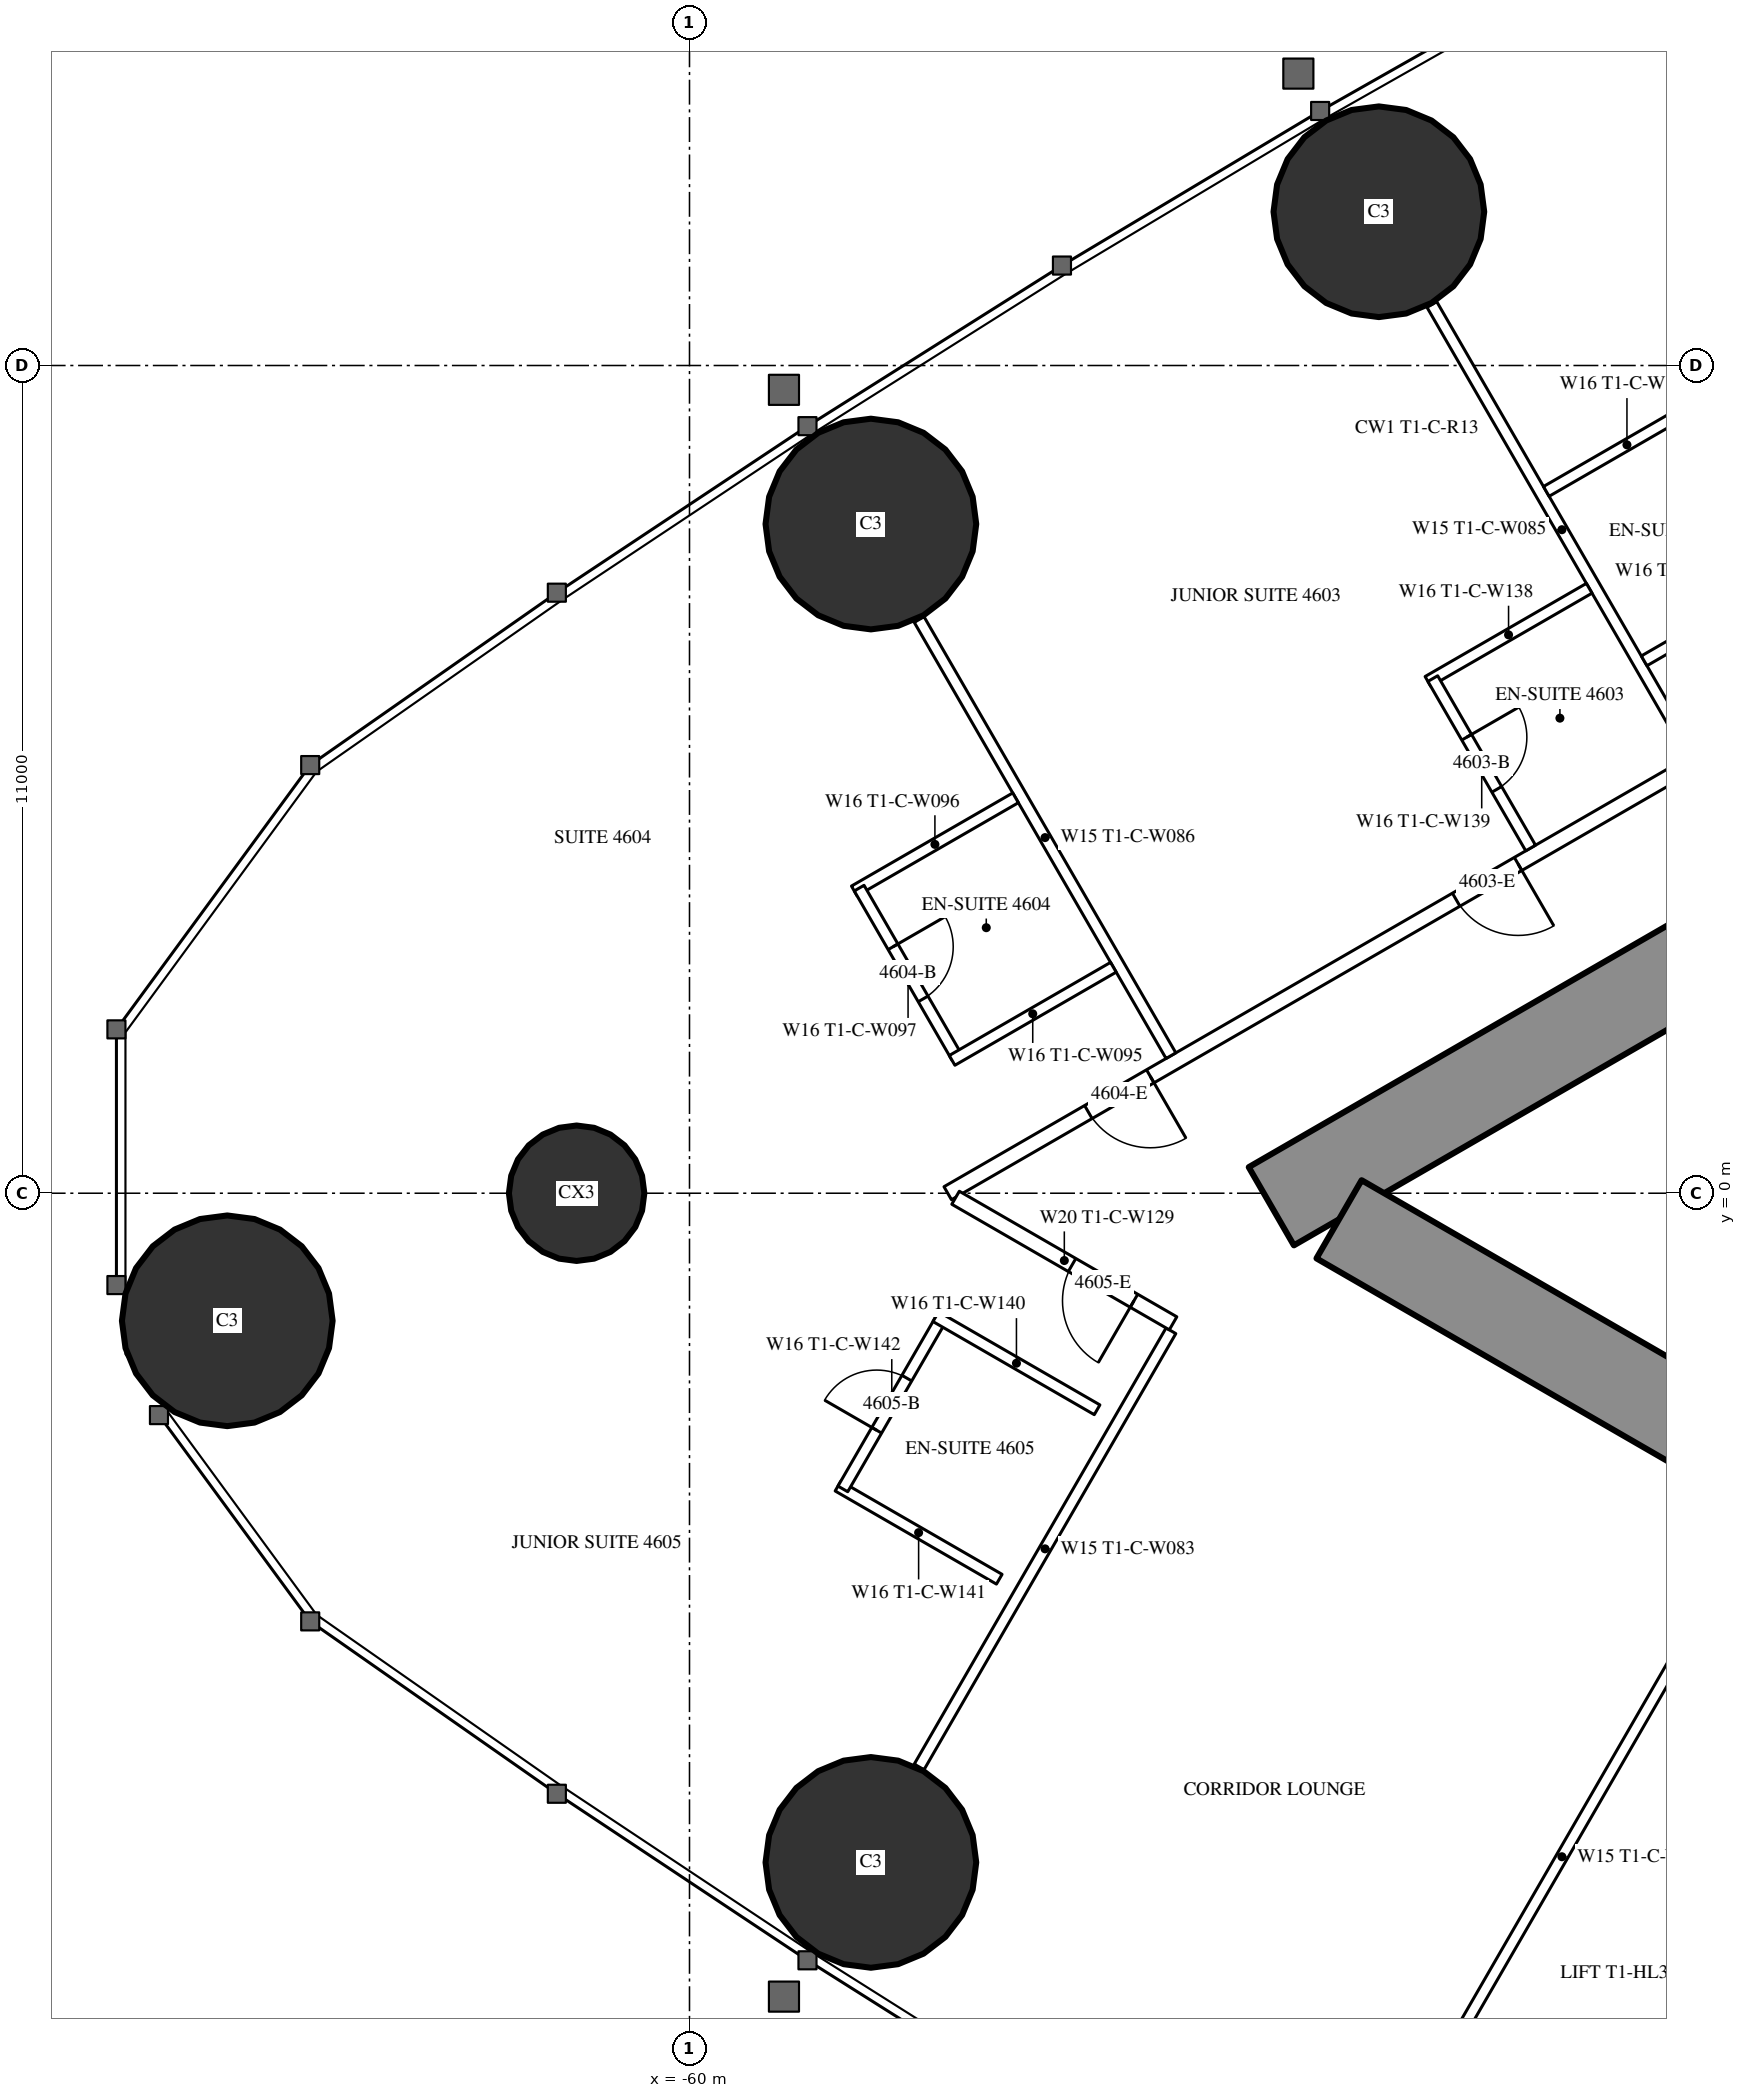
"""IFC4 building model, lengths in metres.
Left out: names, types, materials, properties, quantities, classifications, styles, units other than length and angle.
Written with IfcOpenShell. Run it as: python <this file> out.ifc"""

import sys

from ifc_helpers import new_model, si_unit, direction, frame, frame_2d, origin, origin_2d, place, context, subcontext, project, spatial, rectangle, circle, extrude, element, fill, save


model = new_model("IFC4")
c1 = context("Model", 3, precision=1e-05, world=origin(), true_north=direction((0.0, 1.0)))
c2 = subcontext(c1, "Body", "Model", "MODEL_VIEW")
j1 = project(units=[si_unit("LENGTHUNIT", "METRE"), si_unit("PLANEANGLEUNIT", "RADIAN")], contexts=[c1])
p1 = place(None, origin())
s1 = spatial("IfcSite", under=j1, at=p1, CompositionType="ELEMENT")
p2 = place(p1, origin())
s2 = spatial("IfcBuilding", under=s1, at=p2, CompositionType="ELEMENT")
p3 = place(p2, frame((0.0, 0.0, 173.8)))
s3 = spatial("IfcBuildingStorey", under=s2, at=p3, CompositionType="ELEMENT", Elevation=173.8)
for number, where, z_axis, x_axis in (
    (1, (-66.143, -1.695, 0.0), (0.0, 0.0, 1.0), (1.0, 0.0, 0.0)),
    (2, (-57.59, -8.893, 0.0), (0.0, 0.0, 1.0), (1.0, 0.0, 0.0)),
    (3, (-50.839, 13.043, 0.0), (0.0, 0.0, 1.0), (1.0, 0.0, 0.0)),
    (4, (-57.59, 8.893, 0.0), (0.0, 0.0, 1.0), (1.0, 0.0, 0.0)),
):
    element("IfcColumn", number, at=place(p3, frame(where, z_axis=z_axis, x_axis=x_axis)), inside=s3, PredefinedType="COLUMN", context=c2, shape_type="SweptSolid", body=[
        extrude(circle(Radius=1.4, at=origin_2d()), origin(), (0.0, 0.0, 1.0), 3.5),
    ])
p4 = place(p3, frame((-61.5, 0.0, 0.0), z_axis=(0.0, 0.0, 1.0), x_axis=(1.0, 0.0, 0.0)))
e5 = element("IfcColumn", 5, at=p4, inside=s3, PredefinedType="COLUMN", context=c2, shape_type="SweptSolid", body=[
    extrude(circle(Radius=0.9, at=origin_2d()), origin(), (0.0, 0.0, 1.0), 3.5),
])
p5 = place(p3, frame((-27.2, 14.3, 0.0), z_axis=(0.0, 0.0, 1.0), x_axis=(-0.866026593062, -0.499997940104, 0.0)))
e6 = element("IfcWall", 6, at=p5, inside=s3, PredefinedType="SHEAR", context=c2, shape_type="SweptSolid", body=[
    extrude(rectangle(XDim=28.946, YDim=1.2, at=frame_2d((14.473, 0.0))), origin(), (0.0, 0.0, 1.0), 3.5),
])
p6 = place(p5, frame((4.6, 0.0, 0.0)))
e7 = element("IfcOpeningElement", 7, at=p6, cuts=e6, PredefinedType="OPENING", context=c2, shape_type="SweptSolid", body=[
    extrude(rectangle(XDim=1.0, YDim=2.2, at=frame_2d((0.5, 1.1))), frame((0.0, 0.61, 0.0), z_axis=(0.0, -1.0, 0.0), x_axis=(1.0, 0.0, 0.0)), (0.0, 0.0, 1.0), 1.22),
])
p7 = place(p5, frame((13.395, 0.0, 0.0)))
e8 = element("IfcOpeningElement", 8, at=p7, cuts=e6, PredefinedType="OPENING", context=c2, shape_type="SweptSolid", body=[
    extrude(rectangle(XDim=1.8, YDim=2.2, at=frame_2d((0.9, 1.1))), frame((0.0, 0.61, 0.0), z_axis=(0.0, -1.0, 0.0), x_axis=(1.0, 0.0, 0.0)), (0.0, 0.0, 1.0), 1.22),
])
p8 = place(p3, frame((-27.2, -14.3, 0.0), z_axis=(0.0, 0.0, 1.0), x_axis=(-0.866024021859, 0.500002393557, 0.0)))
e9 = element("IfcWall", 9, at=p8, inside=s3, PredefinedType="SHEAR", context=c2, shape_type="SweptSolid", body=[
    extrude(rectangle(XDim=27.907, YDim=1.2, at=frame_2d((13.954, 0.0))), origin(), (0.0, 0.0, 1.0), 3.5),
])
p9 = place(p8, frame((4.6, 0.0, 0.0)))
e10 = element("IfcOpeningElement", 10, at=p9, cuts=e9, PredefinedType="OPENING", context=c2, shape_type="SweptSolid", body=[
    extrude(rectangle(XDim=1.0, YDim=2.2, at=frame_2d((0.5, 1.1))), frame((0.0, 0.61, 0.0), z_axis=(0.0, -1.0, 0.0), x_axis=(1.0, 0.0, 0.0)), (0.0, 0.0, 1.0), 1.22),
])
p10 = place(p8, frame((13.395, 0.0, 0.0)))
e11 = element("IfcOpeningElement", 11, at=p10, cuts=e9, PredefinedType="OPENING", context=c2, shape_type="SweptSolid", body=[
    extrude(rectangle(XDim=1.8, YDim=2.2, at=frame_2d((0.9, 1.1))), frame((0.0, 0.61, 0.0), z_axis=(0.0, -1.0, 0.0), x_axis=(1.0, 0.0, 0.0)), (0.0, 0.0, 1.0), 1.22),
])
p11 = place(p3, frame((-27.86, 16.575, 0.0), z_axis=(0.0, 0.0, 1.0), x_axis=(-0.866025533911, -0.499999774615, 0.0)))
e12 = element("IfcWall", 12, at=p11, inside=s3, PredefinedType="PARTITIONING", context=c2, shape_type="SweptSolid", body=[
    extrude(rectangle(XDim=33.149, YDim=0.2, at=frame_2d((16.575, 0.0))), origin(), (0.0, 0.0, 1.0), 3.25),
])
p12 = place(p11, frame((3.75, 0.0, 0.0)))
e13 = element("IfcOpeningElement", 13, at=p12, cuts=e12, PredefinedType="OPENING", context=c2, shape_type="SweptSolid", body=[
    extrude(rectangle(XDim=1.0, YDim=2.2, at=frame_2d((0.5, 1.1))), frame((0.0, 0.11, 0.0), z_axis=(0.0, -1.0, 0.0), x_axis=(1.0, 0.0, 0.0)), (0.0, 0.0, 1.0), 0.22),
])
p13 = place(p11, frame((20.347, 0.0, 0.0)))
e14 = element("IfcOpeningElement", 14, at=p13, cuts=e12, PredefinedType="OPENING", context=c2, shape_type="SweptSolid", body=[
    extrude(rectangle(XDim=0.95, YDim=2.2, at=frame_2d((0.475, 1.1))), frame((0.0, 0.11, 0.0), z_axis=(0.0, -1.0, 0.0), x_axis=(1.0, 0.0, 0.0)), (0.0, 0.0, 1.0), 0.22),
])
p14 = place(p11, frame((24.397, 0.0, 0.0)))
e15 = element("IfcOpeningElement", 15, at=p14, cuts=e12, PredefinedType="OPENING", context=c2, shape_type="SweptSolid", body=[
    extrude(rectangle(XDim=0.95, YDim=2.2, at=frame_2d((0.475, 1.1))), frame((0.0, 0.11, 0.0), z_axis=(0.0, -1.0, 0.0), x_axis=(1.0, 0.0, 0.0)), (0.0, 0.0, 1.0), 0.22),
])
p15 = place(p11, frame((30.042, 0.0, 0.0)))
e16 = element("IfcOpeningElement", 16, at=p15, cuts=e12, PredefinedType="OPENING", context=c2, shape_type="SweptSolid", body=[
    extrude(rectangle(XDim=0.95, YDim=2.2, at=frame_2d((0.475, 1.1))), frame((0.0, 0.11, 0.0), z_axis=(0.0, -1.0, 0.0), x_axis=(1.0, 0.0, 0.0)), (0.0, 0.0, 1.0), 0.22),
])
p16 = place(p3, frame((-46.679, 5.825, 0.0), z_axis=(0.0, 0.0, 1.0), x_axis=(-0.500006839597, 0.866021454905, 0.0)))
e17 = element("IfcWall", 17, at=p16, inside=s3, PredefinedType="PARTITIONING", context=c2, shape_type="SweptSolid", body=[
    extrude(rectangle(XDim=6.911, YDim=0.15, at=frame_2d((3.456, 0.0))), origin(), (0.0, 0.0, 1.0), 2.3),
])
p17 = place(p3, frame((-53.602, 1.828, 0.0), z_axis=(0.0, 0.0, 1.0), x_axis=(-0.49999191814, 0.866030069798, 0.0)))
e18 = element("IfcWall", 18, at=p17, inside=s3, PredefinedType="PARTITIONING", context=c2, shape_type="SweptSolid", body=[
    extrude(rectangle(XDim=6.692, YDim=0.15, at=frame_2d((3.346, 0.0))), origin(), (0.0, 0.0, 1.0), 2.3),
])
p18 = place(p3, frame((-46.679, -5.825, 0.0), z_axis=(0.0, 0.0, 1.0), x_axis=(-0.500006839597, -0.866021454905, 0.0)))
e19 = element("IfcWall", 19, at=p18, inside=s3, PredefinedType="PARTITIONING", context=c2, shape_type="SweptSolid", body=[
    extrude(rectangle(XDim=6.911, YDim=0.15, at=frame_2d((3.456, 0.0))), origin(), (0.0, 0.0, 1.0), 2.3),
])
p19 = place(p3, frame((-53.602, -1.828, 0.0), z_axis=(0.0, 0.0, 1.0), x_axis=(-0.49999191814, -0.866030069798, 0.0)))
e20 = element("IfcWall", 20, at=p19, inside=s3, PredefinedType="PARTITIONING", context=c2, shape_type="SweptSolid", body=[
    extrude(rectangle(XDim=6.692, YDim=0.15, at=frame_2d((3.346, 0.0))), origin(), (0.0, 0.0, 1.0), 2.3),
])
p20 = place(p3, frame((-53.574, -1.729, 0.0), z_axis=(0.0, 0.0, 1.0), x_axis=(-0.866019930389, 0.500009480079, 0.0)))
e21 = element("IfcWall", 21, at=p20, inside=s3, PredefinedType="PARTITIONING", context=c2, shape_type="SweptSolid", body=[
    extrude(rectangle(XDim=3.338, YDim=0.2, at=frame_2d((1.669, 0.0))), origin(), (0.0, 0.0, 1.0), 3.25),
])
p21 = place(p20, frame((0.6, 0.0, 0.0)))
e22 = element("IfcOpeningElement", 22, at=p21, cuts=e21, PredefinedType="OPENING", context=c2, shape_type="SweptSolid", body=[
    extrude(rectangle(XDim=0.95, YDim=2.2, at=frame_2d((0.475, 1.1))), frame((0.0, 0.11, 0.0), z_axis=(0.0, -1.0, 0.0), x_axis=(1.0, 0.0, 0.0)), (0.0, 0.0, 1.0), 0.22),
])
p22 = place(p3, frame((-46.47, 10.564, 0.0), z_axis=(0.0, 0.0, 1.0), x_axis=(-0.866006523861, -0.500032699561, 0.0)))
e23 = element("IfcWall", 23, at=p22, inside=s3, PredefinedType="PARTITIONING", context=c2, shape_type="SweptSolid", body=[
    extrude(rectangle(XDim=2.475, YDim=0.15, at=frame_2d((1.237, 0.0))), origin(), (0.0, 0.0, 1.0), 3.25),
])
for number, where, z_axis, x_axis in (
    (24, (-45.17, 8.312, 0.0), (0.0, 0.0, 1.0), (-0.866, -0.5, 0.0)),
    (25, (-48.044, 8.039, 0.0), (0.0, 0.0, 1.0), (-0.866, -0.5, 0.0)),
):
    element("IfcWall", number, at=place(p3, frame(where, z_axis=z_axis, x_axis=x_axis)), inside=s3, PredefinedType="PARTITIONING", context=c2, shape_type="SweptSolid", body=[
        extrude(rectangle(XDim=2.475, YDim=0.15, at=frame_2d((1.238, 0.0))), origin(), (0.0, 0.0, 1.0), 3.25),
    ])
p23 = place(p3, frame((-48.822, 4.588, 0.0), z_axis=(0.0, 0.0, 1.0), x_axis=(-0.500006934395, 0.866021400173, 0.0)))
e26 = element("IfcWall", 26, at=p23, inside=s3, PredefinedType="PARTITIONING", context=c2, shape_type="SweptSolid", body=[
    extrude(rectangle(XDim=2.6, YDim=0.15, at=frame_2d((1.3, 0.0))), origin(), (0.0, 0.0, 1.0), 3.25),
])
p24 = place(p23, frame((0.9, 0.0, 0.0)))
e27 = element("IfcOpeningElement", 27, at=p24, cuts=e26, PredefinedType="OPENING", context=c2, shape_type="SweptSolid", body=[
    extrude(rectangle(XDim=0.8, YDim=2.2, at=frame_2d((0.4, 1.1))), frame((0.0, 0.085, 0.0), z_axis=(0.0, -1.0, 0.0), x_axis=(1.0, 0.0, 0.0)), (0.0, 0.0, 1.0), 0.17),
])
p25 = place(p3, frame((-55.667, 5.255, 0.0), z_axis=(0.0, 0.0, 1.0), x_axis=(-0.866006523861, -0.500032699561, 0.0)))
e28 = element("IfcWall", 28, at=p25, inside=s3, PredefinedType="PARTITIONING", context=c2, shape_type="SweptSolid", body=[
    extrude(rectangle(XDim=2.475, YDim=0.15, at=frame_2d((1.237, 0.0))), origin(), (0.0, 0.0, 1.0), 3.25),
])
p26 = place(p3, frame((-56.446, 1.803, 0.0), z_axis=(0.0, 0.0, 1.0), x_axis=(-0.499936506574, 0.866062058628, 0.0)))
e29 = element("IfcWall", 29, at=p26, inside=s3, PredefinedType="PARTITIONING", context=c2, shape_type="SweptSolid", body=[
    extrude(rectangle(XDim=2.6, YDim=0.15, at=frame_2d((1.3, 0.0))), origin(), (0.0, 0.0, 1.0), 3.25),
])
p27 = place(p26, frame((0.9, 0.0, 0.0)))
e30 = element("IfcOpeningElement", 30, at=p27, cuts=e29, PredefinedType="OPENING", context=c2, shape_type="SweptSolid", body=[
    extrude(rectangle(XDim=0.8, YDim=2.2, at=frame_2d((0.4, 1.1))), frame((0.0, 0.085, 0.0), z_axis=(0.0, -1.0, 0.0), x_axis=(1.0, 0.0, 0.0)), (0.0, 0.0, 1.0), 0.17),
])
p28 = place(p3, frame((-54.367, 3.003, 0.0), z_axis=(0.0, 0.0, 1.0), x_axis=(-0.866031185235, -0.4999899861, 0.0)))
e31 = element("IfcWall", 31, at=p28, inside=s3, PredefinedType="PARTITIONING", context=c2, shape_type="SweptSolid", body=[
    extrude(rectangle(XDim=2.475, YDim=0.15, at=frame_2d((1.238, 0.0))), origin(), (0.0, 0.0, 1.0), 3.25),
])
p29 = place(p3, frame((-55.884, -5.13, 0.0), z_axis=(0.0, 0.0, 1.0), x_axis=(-0.866006523861, 0.500032699561, 0.0)))
e32 = element("IfcWall", 32, at=p29, inside=s3, PredefinedType="PARTITIONING", context=c2, shape_type="SweptSolid", body=[
    extrude(rectangle(XDim=2.475, YDim=0.15, at=frame_2d((1.237, 0.0))), origin(), (0.0, 0.0, 1.0), 3.25),
])
p30 = place(p3, frame((-56.662, -1.678, 0.0), z_axis=(0.0, 0.0, 1.0), x_axis=(-0.500006934395, -0.866021400173, 0.0)))
e33 = element("IfcWall", 33, at=p30, inside=s3, PredefinedType="PARTITIONING", context=c2, shape_type="SweptSolid", body=[
    extrude(rectangle(XDim=2.6, YDim=0.15, at=frame_2d((1.3, 0.0))), origin(), (0.0, 0.0, 1.0), 3.25),
])
p31 = place(p30, frame((0.9, 0.0, 0.0)))
e34 = element("IfcOpeningElement", 34, at=p31, cuts=e33, PredefinedType="OPENING", context=c2, shape_type="SweptSolid", body=[
    extrude(rectangle(XDim=0.8, YDim=2.2, at=frame_2d((0.4, 1.1))), frame((0.0, 0.085, 0.0), z_axis=(0.0, -1.0, 0.0), x_axis=(1.0, 0.0, 0.0)), (0.0, 0.0, 1.0), 0.17),
])
p32 = place(p3, frame((-54.583, -2.878, 0.0), z_axis=(0.0, 0.0, 1.0), x_axis=(-0.866006523861, 0.500032699561, 0.0)))
e35 = element("IfcWall", 35, at=p32, inside=s3, PredefinedType="PARTITIONING", context=c2, shape_type="SweptSolid", body=[
    extrude(rectangle(XDim=2.475, YDim=0.15, at=frame_2d((1.237, 0.0))), origin(), (0.0, 0.0, 1.0), 3.25),
])
p33 = place(p3, frame((-45.428, -8.568, 0.0), z_axis=(0.0, 0.0, 1.0), x_axis=(-0.499929347863, -0.866066190972, 0.0)))
e36 = element("IfcWall", 36, at=p33, inside=s3, PredefinedType="PARTITIONING", context=c2, shape_type="SweptSolid", body=[
    extrude(rectangle(XDim=3.201, YDim=0.25, at=frame_2d((1.6, 0.0))), origin(), (0.0, 0.0, 1.0), 3.25),
])
p34 = place(p24, origin())
e37 = element("IfcDoor", 37, at=p34, inside=s3, OperationType="SINGLE_SWING_RIGHT", PredefinedType="DOOR", context=c2, shape_type="SweptSolid", body=[
    extrude(rectangle(XDim=0.8, YDim=2.2, at=frame_2d((0.4, 1.1))), frame((0.0, 0.025, 0.0), z_axis=(0.0, -1.0, 0.0), x_axis=(1.0, 0.0, 0.0)), (0.0, 0.0, 1.0), 0.05),
])
fill(e27, e37)
p35 = place(p14, origin())
e38 = element("IfcDoor", 38, at=p35, inside=s3, OperationType="SINGLE_SWING_LEFT", PredefinedType="DOOR", context=c2, shape_type="SweptSolid", body=[
    extrude(rectangle(XDim=0.95, YDim=2.2, at=frame_2d((0.475, 1.1))), frame((0.0, 0.025, 0.0), z_axis=(0.0, -1.0, 0.0), x_axis=(1.0, 0.0, 0.0)), (0.0, 0.0, 1.0), 0.05),
])
fill(e15, e38)
p36 = place(p27, origin())
e39 = element("IfcDoor", 39, at=p36, inside=s3, OperationType="SINGLE_SWING_RIGHT", PredefinedType="DOOR", context=c2, shape_type="SweptSolid", body=[
    extrude(rectangle(XDim=0.8, YDim=2.2, at=frame_2d((0.4, 1.1))), frame((0.0, 0.025, 0.0), z_axis=(0.0, -1.0, 0.0), x_axis=(1.0, 0.0, 0.0)), (0.0, 0.0, 1.0), 0.05),
])
fill(e30, e39)
p37 = place(p15, origin())
e40 = element("IfcDoor", 40, at=p37, inside=s3, OperationType="SINGLE_SWING_LEFT", PredefinedType="DOOR", context=c2, shape_type="SweptSolid", body=[
    extrude(rectangle(XDim=0.95, YDim=2.2, at=frame_2d((0.475, 1.1))), frame((0.0, 0.025, 0.0), z_axis=(0.0, -1.0, 0.0), x_axis=(1.0, 0.0, 0.0)), (0.0, 0.0, 1.0), 0.05),
])
fill(e16, e40)
p38 = place(p31, origin())
e41 = element("IfcDoor", 41, at=p38, inside=s3, OperationType="SINGLE_SWING_RIGHT", PredefinedType="DOOR", context=c2, shape_type="SweptSolid", body=[
    extrude(rectangle(XDim=0.8, YDim=2.2, at=frame_2d((0.4, 1.1))), frame((0.0, 0.025, 0.0), z_axis=(0.0, -1.0, 0.0), x_axis=(1.0, 0.0, 0.0)), (0.0, 0.0, 1.0), 0.05),
])
fill(e34, e41)
p39 = place(p21, origin())
e42 = element("IfcDoor", 42, at=p39, inside=s3, OperationType="SINGLE_SWING_LEFT", PredefinedType="DOOR", context=c2, shape_type="SweptSolid", body=[
    extrude(rectangle(XDim=0.95, YDim=2.2, at=frame_2d((0.475, 1.1))), frame((0.0, 0.025, 0.0), z_axis=(0.0, -1.0, 0.0), x_axis=(1.0, 0.0, 0.0)), (0.0, 0.0, 1.0), 0.05),
])
fill(e22, e42)
save(model, sys.argv[1])
